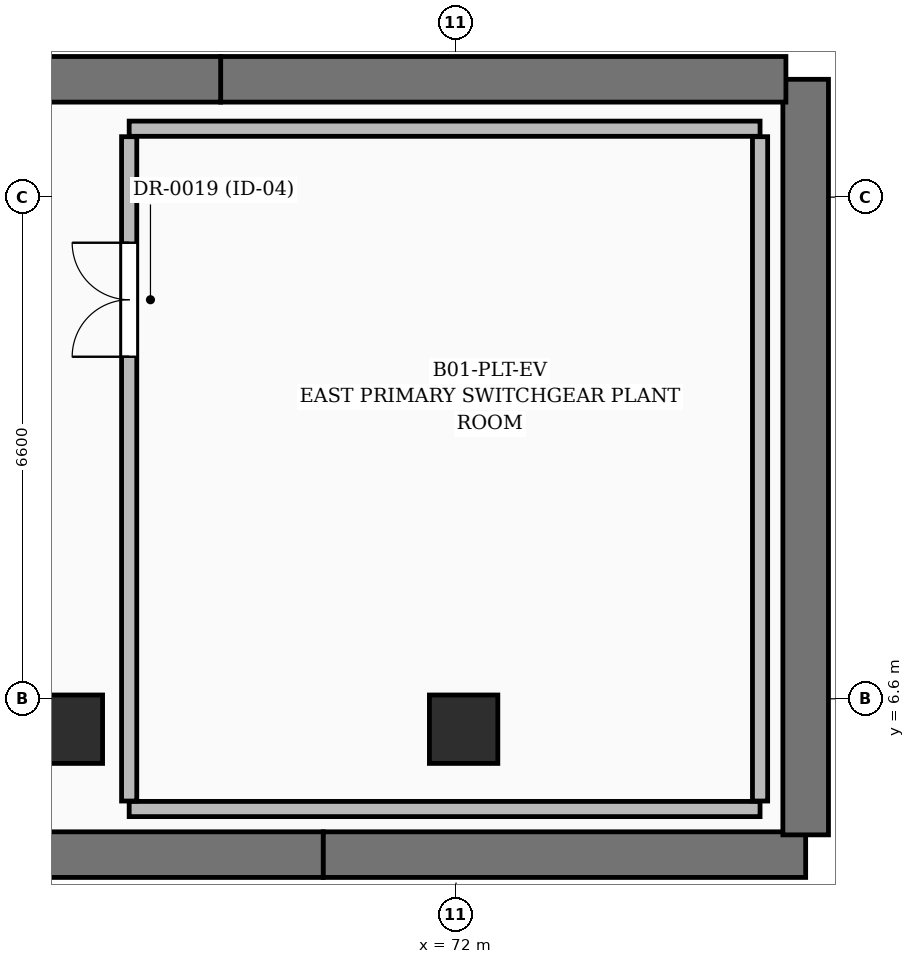
"""IFC4 building model, lengths in metres.
Left out: names, types, materials, properties, quantities, classifications, styles, units other than length and angle.
Written with IfcOpenShell. Run it as: python <this file> out.ifc"""

import sys

from ifc_helpers import new_model, si_unit, direction, frame, frame_2d, origin, origin_2d, place, context, subcontext, project, spatial, rectangle, extrude, element, fill, save


model = new_model("IFC4")
c1 = context("Model", 3, precision=1e-05, world=origin(), true_north=direction((0.0, 1.0)))
c2 = subcontext(c1, "Body", "Model", "MODEL_VIEW")
j1 = project(units=[si_unit("LENGTHUNIT", "METRE"), si_unit("PLANEANGLEUNIT", "RADIAN")], contexts=[c1])
p1 = place(None, origin())
s1 = spatial("IfcSite", under=j1, at=p1, CompositionType="ELEMENT")
p2 = place(p1, origin())
s2 = spatial("IfcBuilding", under=s1, at=p2, CompositionType="ELEMENT")
p3 = place(p2, frame((0.0, 0.0, -4.5)))
s3 = spatial("IfcBuildingStorey", under=s2, at=p3, CompositionType="ELEMENT", Elevation=-4.5)
p4 = place(p3, frame((63.908, 4.55, 0.0), z_axis=(0.0, 0.0, 1.0), x_axis=(1.0, 0.0, 0.0)))
e1 = element("IfcWall", 1, at=p4, inside=s3, PredefinedType="USERDEFINED", context=c2, shape_type="SweptSolid", body=[
    extrude(rectangle(XDim=6.346, YDim=0.6, at=frame_2d((3.173, 0.0))), origin(), (0.0, 0.0, 1.0), 4.5),
])
p5 = place(p3, frame((70.254, 4.55, 0.0), z_axis=(0.0, 0.0, 1.0), x_axis=(1.0, 0.0, 0.0)))
e2 = element("IfcWall", 2, at=p5, inside=s3, PredefinedType="USERDEFINED", context=c2, shape_type="SweptSolid", body=[
    extrude(rectangle(XDim=6.346, YDim=0.6, at=frame_2d((3.173, 0.0))), origin(), (0.0, 0.0, 1.0), 4.5),
])
p6 = place(p3, frame((76.6, 4.81, 0.0), z_axis=(0.0, 0.0, 1.0), x_axis=(0.0, 1.0, 0.0)))
e3 = element("IfcWall", 3, at=p6, inside=s3, PredefinedType="USERDEFINED", context=c2, shape_type="SweptSolid", body=[
    extrude(rectangle(XDim=9.94, YDim=0.6, at=frame_2d((4.97, 0.0))), origin(), (0.0, 0.0, 1.0), 4.5),
])
for number, where, z_axis, x_axis in (
    (4, (76.34, 14.75, 0.0), (0.0, 0.0, 1.0), (-1.0, 0.0, 0.0)),
    (5, (68.904, 14.75, 0.0), (0.0, 0.0, 1.0), (-1.0, 0.0, 0.0)),
):
    element("IfcWall", number, at=place(p3, frame(where, z_axis=z_axis, x_axis=x_axis)), inside=s3, PredefinedType="USERDEFINED", context=c2, shape_type="SweptSolid", body=[
        extrude(rectangle(XDim=7.437, YDim=0.6, at=frame_2d((3.718, 0.0))), origin(), (0.0, 0.0, 1.0), 4.5),
    ])
for number, where, z_axis, x_axis in (
    (6, (72.1, 6.2, 0.0), (0.0, 0.0, 1.0), (1.0, 0.0, 0.0)),
    (7, (66.9, 6.2, 0.0), (0.0, 0.0, 1.0), (1.0, 0.0, 0.0)),
):
    element("IfcColumn", number, at=place(p3, frame(where, z_axis=z_axis, x_axis=x_axis)), inside=s3, PredefinedType="COLUMN", context=c2, shape_type="SweptSolid", body=[
        extrude(rectangle(XDim=0.9, YDim=0.9, at=origin_2d()), origin(), (0.0, 0.0, 1.0), 4.2),
    ])
for number, where, z_axis, x_axis in (
    (8, (67.7, 5.15, 0.0), (0.0, 0.0, 1.0), (1.0, 0.0, 0.0)),
    (9, (67.7, 14.1, 0.0), (0.0, 0.0, 1.0), (1.0, 0.0, 0.0)),
):
    element("IfcWall", number, at=place(p3, frame(where, z_axis=z_axis, x_axis=x_axis)), inside=s3, PredefinedType="PARTITIONING", context=c2, shape_type="SweptSolid", body=[
        extrude(rectangle(XDim=8.3, YDim=0.2, at=frame_2d((4.15, 0.0))), origin(), (0.0, 0.0, 1.0), 3.464),
    ])
p7 = place(p3, frame((67.7, 5.255, 0.0), z_axis=(0.0, 0.0, 1.0), x_axis=(0.0, 1.0, 0.0)))
e10 = element("IfcWall", 10, at=p7, inside=s3, PredefinedType="PARTITIONING", context=c2, shape_type="SweptSolid", body=[
    extrude(rectangle(XDim=8.74, YDim=0.2, at=frame_2d((4.37, 0.0))), origin(), (0.0, 0.0, 1.0), 3.464),
])
p8 = place(p7, frame((5.845, 0.0, 0.0)))
e11 = element("IfcOpeningElement", 11, at=p8, cuts=e10, PredefinedType="OPENING", context=c2, shape_type="SweptSolid", body=[
    extrude(rectangle(XDim=1.5, YDim=2.2, at=frame_2d((0.75, 1.1))), frame((0.0, 0.11, 0.0), z_axis=(0.0, -1.0, 0.0), x_axis=(1.0, 0.0, 0.0)), (0.0, 0.0, 1.0), 0.22),
])
p9 = place(p3, frame((76.0, 5.255, 0.0), z_axis=(0.0, 0.0, 1.0), x_axis=(0.0, 1.0, 0.0)))
e12 = element("IfcWall", 12, at=p9, inside=s3, PredefinedType="PARTITIONING", context=c2, shape_type="SweptSolid", body=[
    extrude(rectangle(XDim=8.74, YDim=0.2, at=frame_2d((4.37, 0.0))), origin(), (0.0, 0.0, 1.0), 3.464),
])
p10 = place(p8, origin())
e13 = element("IfcDoor", 13, at=p10, inside=s3, OperationType="DOUBLE_DOOR_SINGLE_SWING", PredefinedType="DOOR", context=c2, shape_type="SweptSolid", body=[
    extrude(rectangle(XDim=1.5, YDim=2.2, at=frame_2d((0.75, 1.1))), frame((0.0, 0.025, 0.0), z_axis=(0.0, -1.0, 0.0), x_axis=(1.0, 0.0, 0.0)), (0.0, 0.0, 1.0), 0.05),
])
fill(e11, e13)
save(model, sys.argv[1])
